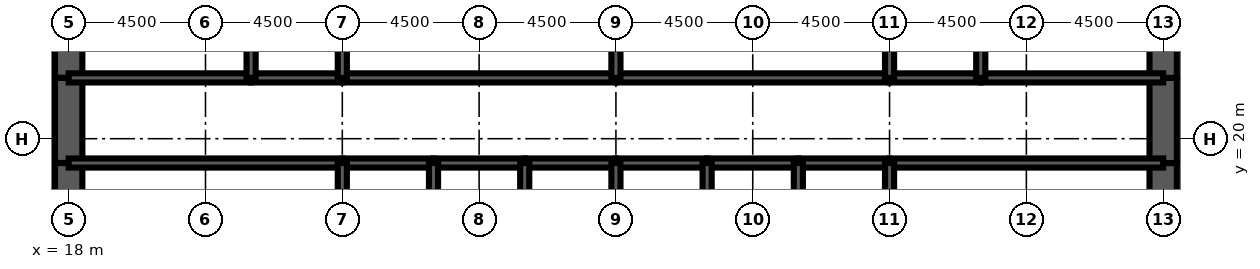
"""IFC4 building model, lengths in metres.
Left out: names, types, materials, properties, quantities, classifications, styles, units other than length and angle.
Written with IfcOpenShell. Run it as: python <this file> out.ifc"""

import sys

from ifc_helpers import new_model, si_unit, direction, frame, frame_2d, origin, place, context, subcontext, project, spatial, rectangle, extrude, element, fill, save


model = new_model("IFC4")
c1 = context("Model", 3, precision=1e-05, world=origin(), true_north=direction((0.0, 1.0)))
c2 = subcontext(c1, "Body", "Model", "MODEL_VIEW")
j1 = project(units=[si_unit("LENGTHUNIT", "METRE"), si_unit("PLANEANGLEUNIT", "RADIAN")], contexts=[c1])
p1 = place(None, origin())
s1 = spatial("IfcSite", under=j1, at=p1, CompositionType="ELEMENT")
p2 = place(p1, origin())
s2 = spatial("IfcBuilding", under=s1, at=p2, CompositionType="ELEMENT")
p3 = place(p2, frame((0.0, 0.0, 41.0)))
s3 = spatial("IfcBuildingStorey", under=s2, at=p3, CompositionType="ELEMENT", Elevation=41.0)
p4 = place(p3, frame((18.0, 26.0, 0.0), z_axis=(0.0, 0.0, 1.0), x_axis=(0.0, -1.0, 0.0)))
e1 = element("IfcWall", 1, at=p4, inside=s3, PredefinedType="SHEAR", context=c2, shape_type="SweptSolid", body=[
    extrude(rectangle(XDim=4.0, YDim=0.9, at=frame_2d((2.0, 0.0))), origin(), (0.0, 0.0, 1.0), 4.5),
])
p5 = place(p3, frame((18.0, 22.0, 0.0), z_axis=(0.0, 0.0, 1.0), x_axis=(0.0, -1.0, 0.0)))
e2 = element("IfcWall", 2, at=p5, inside=s3, PredefinedType="SHEAR", context=c2, shape_type="SweptSolid", body=[
    extrude(rectangle(XDim=2.8, YDim=0.9, at=frame_2d((1.4, 0.0))), origin(), (0.0, 0.0, 1.0), 4.5),
])
p6 = place(p5, frame((0.6, 0.0, 0.0)))
e3 = element("IfcOpeningElement", 3, at=p6, cuts=e2, PredefinedType="OPENING", context=c2, shape_type="SweptSolid", body=[
    extrude(rectangle(XDim=1.8, YDim=2.1, at=frame_2d((0.9, 1.05))), frame((0.0, 0.46, 0.0), z_axis=(0.0, -1.0, 0.0), x_axis=(1.0, 0.0, 0.0)), (0.0, 0.0, 1.0), 0.92),
])
for number, where, z_axis, x_axis in (
    (4, (18.0, 19.2, 0.0), (0.0, 0.0, 1.0), (0.0, -1.0, 0.0)),
    (5, (54.0, 16.0, 0.0), (0.0, 0.0, 1.0), (0.0, 1.0, 0.0)),
):
    element("IfcWall", number, at=place(p3, frame(where, z_axis=z_axis, x_axis=x_axis)), inside=s3, PredefinedType="SHEAR", context=c2, shape_type="SweptSolid", body=[
        extrude(rectangle(XDim=3.2, YDim=0.9, at=frame_2d((1.6, 0.0))), origin(), (0.0, 0.0, 1.0), 4.5),
    ])
p7 = place(p3, frame((54.0, 19.2, 0.0), z_axis=(0.0, 0.0, 1.0), x_axis=(0.0, 1.0, 0.0)))
e6 = element("IfcWall", 6, at=p7, inside=s3, PredefinedType="SHEAR", context=c2, shape_type="SweptSolid", body=[
    extrude(rectangle(XDim=2.8, YDim=0.9, at=frame_2d((1.4, 0.0))), origin(), (0.0, 0.0, 1.0), 4.5),
])
p8 = place(p7, frame((0.4, 0.0, 0.0)))
e7 = element("IfcOpeningElement", 7, at=p8, cuts=e6, PredefinedType="OPENING", context=c2, shape_type="SweptSolid", body=[
    extrude(rectangle(XDim=1.8, YDim=2.1, at=frame_2d((0.9, 1.05))), frame((0.0, 0.46, 0.0), z_axis=(0.0, -1.0, 0.0), x_axis=(1.0, 0.0, 0.0)), (0.0, 0.0, 1.0), 0.92),
])
p9 = place(p3, frame((54.0, 22.0, 0.0), z_axis=(0.0, 0.0, 1.0), x_axis=(0.0, 1.0, 0.0)))
e8 = element("IfcWall", 8, at=p9, inside=s3, PredefinedType="SHEAR", context=c2, shape_type="SweptSolid", body=[
    extrude(rectangle(XDim=4.0, YDim=0.9, at=frame_2d((2.0, 0.0))), origin(), (0.0, 0.0, 1.0), 4.5),
])
p10 = place(p3, frame((18.0, 19.2, 0.0), z_axis=(0.0, 0.0, 1.0), x_axis=(1.0, 0.0, 0.0)))
e9 = element("IfcWall", 9, at=p10, inside=s3, PredefinedType="SOLIDWALL", context=c2, shape_type="SweptSolid", body=[
    extrude(rectangle(XDim=9.0, YDim=0.3, at=frame_2d((4.5, 0.0))), origin(), (0.0, 0.0, 1.0), 4.5),
])
p11 = place(p10, frame((0.65, 0.0, 0.0)))
e10 = element("IfcOpeningElement", 10, at=p11, cuts=e9, PredefinedType="OPENING", context=c2, shape_type="SweptSolid", body=[
    extrude(rectangle(XDim=1.0, YDim=2.1, at=frame_2d((0.5, 1.05))), frame((0.0, 0.16, 0.0), z_axis=(0.0, -1.0, 0.0), x_axis=(1.0, 0.0, 0.0)), (0.0, 0.0, 1.0), 0.32),
])
p12 = place(p3, frame((27.0, 19.2, 0.0), z_axis=(0.0, 0.0, 1.0), x_axis=(1.0, 0.0, 0.0)))
e11 = element("IfcWall", 11, at=p12, inside=s3, PredefinedType="SOLIDWALL", context=c2, shape_type="SweptSolid", body=[
    extrude(rectangle(XDim=3.0, YDim=0.3, at=frame_2d((1.5, 0.0))), origin(), (0.0, 0.0, 1.0), 4.5),
])
p13 = place(p12, frame((0.95, 0.0, 0.0)))
e12 = element("IfcOpeningElement", 12, at=p13, cuts=e11, PredefinedType="OPENING", context=c2, shape_type="SweptSolid", body=[
    extrude(rectangle(XDim=1.1, YDim=2.2, at=frame_2d((0.55, 1.1))), frame((0.0, 0.16, 0.0), z_axis=(0.0, -1.0, 0.0), x_axis=(1.0, 0.0, 0.0)), (0.0, 0.0, 1.0), 0.32),
])
p14 = place(p3, frame((30.0, 19.2, 0.0), z_axis=(0.0, 0.0, 1.0), x_axis=(1.0, 0.0, 0.0)))
e13 = element("IfcWall", 13, at=p14, inside=s3, PredefinedType="SOLIDWALL", context=c2, shape_type="SweptSolid", body=[
    extrude(rectangle(XDim=3.0, YDim=0.3, at=frame_2d((1.5, 0.0))), origin(), (0.0, 0.0, 1.0), 4.5),
])
p15 = place(p14, frame((0.95, 0.0, 0.0)))
e14 = element("IfcOpeningElement", 14, at=p15, cuts=e13, PredefinedType="OPENING", context=c2, shape_type="SweptSolid", body=[
    extrude(rectangle(XDim=1.1, YDim=2.2, at=frame_2d((0.55, 1.1))), frame((0.0, 0.16, 0.0), z_axis=(0.0, -1.0, 0.0), x_axis=(1.0, 0.0, 0.0)), (0.0, 0.0, 1.0), 0.32),
])
p16 = place(p3, frame((33.0, 19.2, 0.0), z_axis=(0.0, 0.0, 1.0), x_axis=(1.0, 0.0, 0.0)))
e15 = element("IfcWall", 15, at=p16, inside=s3, PredefinedType="SOLIDWALL", context=c2, shape_type="SweptSolid", body=[
    extrude(rectangle(XDim=3.0, YDim=0.3, at=frame_2d((1.5, 0.0))), origin(), (0.0, 0.0, 1.0), 4.5),
])
p17 = place(p16, frame((0.95, 0.0, 0.0)))
e16 = element("IfcOpeningElement", 16, at=p17, cuts=e15, PredefinedType="OPENING", context=c2, shape_type="SweptSolid", body=[
    extrude(rectangle(XDim=1.1, YDim=2.2, at=frame_2d((0.55, 1.1))), frame((0.0, 0.16, 0.0), z_axis=(0.0, -1.0, 0.0), x_axis=(1.0, 0.0, 0.0)), (0.0, 0.0, 1.0), 0.32),
])
p18 = place(p3, frame((36.0, 19.2, 0.0), z_axis=(0.0, 0.0, 1.0), x_axis=(1.0, 0.0, 0.0)))
e17 = element("IfcWall", 17, at=p18, inside=s3, PredefinedType="SOLIDWALL", context=c2, shape_type="SweptSolid", body=[
    extrude(rectangle(XDim=3.0, YDim=0.3, at=frame_2d((1.5, 0.0))), origin(), (0.0, 0.0, 1.0), 4.5),
])
p19 = place(p18, frame((0.95, 0.0, 0.0)))
e18 = element("IfcOpeningElement", 18, at=p19, cuts=e17, PredefinedType="OPENING", context=c2, shape_type="SweptSolid", body=[
    extrude(rectangle(XDim=1.1, YDim=2.2, at=frame_2d((0.55, 1.1))), frame((0.0, 0.16, 0.0), z_axis=(0.0, -1.0, 0.0), x_axis=(1.0, 0.0, 0.0)), (0.0, 0.0, 1.0), 0.32),
])
for number, where, z_axis, x_axis in (
    (19, (39.0, 19.2, 0.0), (0.0, 0.0, 1.0), (1.0, 0.0, 0.0)),
    (20, (42.0, 19.2, 0.0), (0.0, 0.0, 1.0), (1.0, 0.0, 0.0)),
):
    element("IfcWall", number, at=place(p3, frame(where, z_axis=z_axis, x_axis=x_axis)), inside=s3, PredefinedType="SOLIDWALL", context=c2, shape_type="SweptSolid", body=[
        extrude(rectangle(XDim=3.0, YDim=0.3, at=frame_2d((1.5, 0.0))), origin(), (0.0, 0.0, 1.0), 4.5),
    ])
p20 = place(p3, frame((45.0, 19.2, 0.0), z_axis=(0.0, 0.0, 1.0), x_axis=(1.0, 0.0, 0.0)))
e21 = element("IfcWall", 21, at=p20, inside=s3, PredefinedType="SOLIDWALL", context=c2, shape_type="SweptSolid", body=[
    extrude(rectangle(XDim=9.0, YDim=0.3, at=frame_2d((4.5, 0.0))), origin(), (0.0, 0.0, 1.0), 4.5),
])
p21 = place(p20, frame((7.35, 0.0, 0.0)))
e22 = element("IfcOpeningElement", 22, at=p21, cuts=e21, PredefinedType="OPENING", context=c2, shape_type="SweptSolid", body=[
    extrude(rectangle(XDim=1.0, YDim=2.1, at=frame_2d((0.5, 1.05))), frame((0.0, 0.16, 0.0), z_axis=(0.0, -1.0, 0.0), x_axis=(1.0, 0.0, 0.0)), (0.0, 0.0, 1.0), 0.32),
])
p22 = place(p3, frame((18.0, 22.0, 0.0), z_axis=(0.0, 0.0, 1.0), x_axis=(1.0, 0.0, 0.0)))
e23 = element("IfcWall", 23, at=p22, inside=s3, PredefinedType="SOLIDWALL", context=c2, shape_type="SweptSolid", body=[
    extrude(rectangle(XDim=6.0, YDim=0.3, at=frame_2d((3.0, 0.0))), origin(), (0.0, 0.0, 1.0), 4.5),
])
p23 = place(p22, frame((4.4, 0.0, 0.0)))
e24 = element("IfcOpeningElement", 24, at=p23, cuts=e23, PredefinedType="OPENING", context=c2, shape_type="SweptSolid", body=[
    extrude(rectangle(XDim=1.0, YDim=2.1, at=frame_2d((0.5, 1.05))), frame((0.0, 0.16, 0.0), z_axis=(0.0, -1.0, 0.0), x_axis=(1.0, 0.0, 0.0)), (0.0, 0.0, 1.0), 0.32),
])
p24 = place(p22, frame((0.85, 0.0, 0.0)))
e25 = element("IfcOpeningElement", 25, at=p24, cuts=e23, PredefinedType="OPENING", context=c2, shape_type="SweptSolid", body=[
    extrude(rectangle(XDim=1.0, YDim=2.1, at=frame_2d((0.5, 1.05))), frame((0.0, 0.16, 0.0), z_axis=(0.0, -1.0, 0.0), x_axis=(1.0, 0.0, 0.0)), (0.0, 0.0, 1.0), 0.32),
])
p25 = place(p3, frame((24.0, 22.0, 0.0), z_axis=(0.0, 0.0, 1.0), x_axis=(1.0, 0.0, 0.0)))
e26 = element("IfcWall", 26, at=p25, inside=s3, PredefinedType="SOLIDWALL", context=c2, shape_type="SweptSolid", body=[
    extrude(rectangle(XDim=3.0, YDim=0.3, at=frame_2d((1.5, 0.0))), origin(), (0.0, 0.0, 1.0), 4.5),
])
p26 = place(p25, frame((1.0, 0.0, 0.0)))
e27 = element("IfcOpeningElement", 27, at=p26, cuts=e26, PredefinedType="OPENING", context=c2, shape_type="SweptSolid", body=[
    extrude(rectangle(XDim=1.0, YDim=2.1, at=frame_2d((0.5, 1.05))), frame((0.0, 0.16, 0.0), z_axis=(0.0, -1.0, 0.0), x_axis=(1.0, 0.0, 0.0)), (0.0, 0.0, 1.0), 0.32),
])
p27 = place(p3, frame((27.0, 22.0, 0.0), z_axis=(0.0, 0.0, 1.0), x_axis=(1.0, 0.0, 0.0)))
e28 = element("IfcWall", 28, at=p27, inside=s3, PredefinedType="SOLIDWALL", context=c2, shape_type="SweptSolid", body=[
    extrude(rectangle(XDim=9.0, YDim=0.3, at=frame_2d((4.5, 0.0))), origin(), (0.0, 0.0, 1.0), 4.5),
])
p28 = place(p27, frame((4.0, 0.0, 0.0)))
e29 = element("IfcOpeningElement", 29, at=p28, cuts=e28, PredefinedType="OPENING", context=c2, shape_type="SweptSolid", body=[
    extrude(rectangle(XDim=1.0, YDim=2.1, at=frame_2d((0.5, 1.05))), frame((0.0, 0.16, 0.0), z_axis=(0.0, -1.0, 0.0), x_axis=(1.0, 0.0, 0.0)), (0.0, 0.0, 1.0), 0.32),
])
p29 = place(p3, frame((36.0, 22.0, 0.0), z_axis=(0.0, 0.0, 1.0), x_axis=(1.0, 0.0, 0.0)))
e30 = element("IfcWall", 30, at=p29, inside=s3, PredefinedType="SOLIDWALL", context=c2, shape_type="SweptSolid", body=[
    extrude(rectangle(XDim=9.0, YDim=0.3, at=frame_2d((4.5, 0.0))), origin(), (0.0, 0.0, 1.0), 4.5),
])
p30 = place(p29, frame((4.0, 0.0, 0.0)))
e31 = element("IfcOpeningElement", 31, at=p30, cuts=e30, PredefinedType="OPENING", context=c2, shape_type="SweptSolid", body=[
    extrude(rectangle(XDim=1.0, YDim=2.1, at=frame_2d((0.5, 1.05))), frame((0.0, 0.16, 0.0), z_axis=(0.0, -1.0, 0.0), x_axis=(1.0, 0.0, 0.0)), (0.0, 0.0, 1.0), 0.32),
])
p31 = place(p3, frame((45.0, 22.0, 0.0), z_axis=(0.0, 0.0, 1.0), x_axis=(1.0, 0.0, 0.0)))
e32 = element("IfcWall", 32, at=p31, inside=s3, PredefinedType="SOLIDWALL", context=c2, shape_type="SweptSolid", body=[
    extrude(rectangle(XDim=3.0, YDim=0.3, at=frame_2d((1.5, 0.0))), origin(), (0.0, 0.0, 1.0), 4.5),
])
p32 = place(p31, frame((1.0, 0.0, 0.0)))
e33 = element("IfcOpeningElement", 33, at=p32, cuts=e32, PredefinedType="OPENING", context=c2, shape_type="SweptSolid", body=[
    extrude(rectangle(XDim=1.0, YDim=2.1, at=frame_2d((0.5, 1.05))), frame((0.0, 0.16, 0.0), z_axis=(0.0, -1.0, 0.0), x_axis=(1.0, 0.0, 0.0)), (0.0, 0.0, 1.0), 0.32),
])
p33 = place(p3, frame((48.0, 22.0, 0.0), z_axis=(0.0, 0.0, 1.0), x_axis=(1.0, 0.0, 0.0)))
e34 = element("IfcWall", 34, at=p33, inside=s3, PredefinedType="SOLIDWALL", context=c2, shape_type="SweptSolid", body=[
    extrude(rectangle(XDim=6.0, YDim=0.3, at=frame_2d((3.0, 0.0))), origin(), (0.0, 0.0, 1.0), 4.5),
])
p34 = place(p33, frame((2.0, 0.0, 0.0)))
e35 = element("IfcOpeningElement", 35, at=p34, cuts=e34, PredefinedType="OPENING", context=c2, shape_type="SweptSolid", body=[
    extrude(rectangle(XDim=1.0, YDim=2.1, at=frame_2d((0.5, 1.05))), frame((0.0, 0.16, 0.0), z_axis=(0.0, -1.0, 0.0), x_axis=(1.0, 0.0, 0.0)), (0.0, 0.0, 1.0), 0.32),
])
p35 = place(p33, frame((4.0, 0.0, 0.0)))
e36 = element("IfcOpeningElement", 36, at=p35, cuts=e34, PredefinedType="OPENING", context=c2, shape_type="SweptSolid", body=[
    extrude(rectangle(XDim=1.0, YDim=2.1, at=frame_2d((0.5, 1.05))), frame((0.0, 0.16, 0.0), z_axis=(0.0, -1.0, 0.0), x_axis=(1.0, 0.0, 0.0)), (0.0, 0.0, 1.0), 0.32),
])
for number, where, z_axis, x_axis in (
    (37, (27.0, 16.0, 0.0), (0.0, 0.0, 1.0), (0.0, 1.0, 0.0)),
    (38, (30.0, 16.0, 0.0), (0.0, 0.0, 1.0), (0.0, 1.0, 0.0)),
    (39, (33.0, 16.0, 0.0), (0.0, 0.0, 1.0), (0.0, 1.0, 0.0)),
    (40, (36.0, 16.0, 0.0), (0.0, 0.0, 1.0), (0.0, 1.0, 0.0)),
    (41, (39.0, 16.0, 0.0), (0.0, 0.0, 1.0), (0.0, 1.0, 0.0)),
    (42, (42.0, 16.0, 0.0), (0.0, 0.0, 1.0), (0.0, 1.0, 0.0)),
    (43, (45.0, 16.0, 0.0), (0.0, 0.0, 1.0), (0.0, 1.0, 0.0)),
):
    element("IfcWall", number, at=place(p3, frame(where, z_axis=z_axis, x_axis=x_axis)), inside=s3, PredefinedType="SOLIDWALL", context=c2, shape_type="SweptSolid", body=[
        extrude(rectangle(XDim=3.2, YDim=0.3, at=frame_2d((1.6, 0.0))), origin(), (0.0, 0.0, 1.0), 4.5),
    ])
for number, where, z_axis, x_axis in (
    (44, (24.0, 22.0, 0.0), (0.0, 0.0, 1.0), (0.0, 1.0, 0.0)),
    (45, (27.0, 22.0, 0.0), (0.0, 0.0, 1.0), (0.0, 1.0, 0.0)),
    (46, (36.0, 22.0, 0.0), (0.0, 0.0, 1.0), (0.0, 1.0, 0.0)),
    (47, (45.0, 22.0, 0.0), (0.0, 0.0, 1.0), (0.0, 1.0, 0.0)),
    (48, (48.0, 22.0, 0.0), (0.0, 0.0, 1.0), (0.0, 1.0, 0.0)),
):
    element("IfcWall", number, at=place(p3, frame(where, z_axis=z_axis, x_axis=x_axis)), inside=s3, PredefinedType="SOLIDWALL", context=c2, shape_type="SweptSolid", body=[
        extrude(rectangle(XDim=4.0, YDim=0.3, at=frame_2d((2.0, 0.0))), origin(), (0.0, 0.0, 1.0), 4.5),
    ])
p36 = place(p3, frame((42.0, 22.15, 0.0), z_axis=(0.0, 0.0, 1.0), x_axis=(0.0, 1.0, 0.0)))
e49 = element("IfcWall", 49, at=p36, inside=s3, PredefinedType="PARTITIONING", context=c2, shape_type="SweptSolid", body=[
    extrude(rectangle(XDim=3.7, YDim=0.15, at=frame_2d((1.85, 0.0))), origin(), (0.0, 0.0, 1.0), 3.0),
])
p37 = place(p36, frame((2.2, 0.0, 0.0)))
e50 = element("IfcOpeningElement", 50, at=p37, cuts=e49, PredefinedType="OPENING", context=c2, shape_type="SweptSolid", body=[
    extrude(rectangle(XDim=1.0, YDim=2.1, at=frame_2d((0.5, 1.05))), frame((0.0, 0.085, 0.0), z_axis=(0.0, -1.0, 0.0), x_axis=(1.0, 0.0, 0.0)), (0.0, 0.0, 1.0), 0.17),
])
for number, where, z_axis, x_axis in (
    (51, (20.325, 22.15, 0.0), (0.0, 0.0, 1.0), (0.0, 1.0, 0.0)),
    (52, (51.375, 22.15, 0.0), (0.0, 0.0, 1.0), (0.0, 1.0, 0.0)),
):
    element("IfcWall", number, at=place(p3, frame(where, z_axis=z_axis, x_axis=x_axis)), inside=s3, PredefinedType="PARTITIONING", context=c2, shape_type="SweptSolid", body=[
        extrude(rectangle(XDim=3.7, YDim=0.15, at=frame_2d((1.85, 0.0))), origin(), (0.0, 0.0, 1.0), 3.0),
    ])
p38 = place(p13, origin())
e53 = element("IfcDoor", 53, at=p38, inside=s3, OperationType="DOUBLE_DOOR_SLIDING", PredefinedType="USERDEFINED", context=c2, shape_type="SweptSolid", body=[
    extrude(rectangle(XDim=1.1, YDim=2.2, at=frame_2d((0.55, 1.1))), frame((0.0, 0.025, 0.0), z_axis=(0.0, -1.0, 0.0), x_axis=(1.0, 0.0, 0.0)), (0.0, 0.0, 1.0), 0.05),
])
fill(e12, e53)
p39 = place(p15, origin())
e54 = element("IfcDoor", 54, at=p39, inside=s3, OperationType="DOUBLE_DOOR_SLIDING", PredefinedType="USERDEFINED", context=c2, shape_type="SweptSolid", body=[
    extrude(rectangle(XDim=1.1, YDim=2.2, at=frame_2d((0.55, 1.1))), frame((0.0, 0.025, 0.0), z_axis=(0.0, -1.0, 0.0), x_axis=(1.0, 0.0, 0.0)), (0.0, 0.0, 1.0), 0.05),
])
fill(e14, e54)
p40 = place(p17, origin())
e55 = element("IfcDoor", 55, at=p40, inside=s3, OperationType="DOUBLE_DOOR_SLIDING", PredefinedType="USERDEFINED", context=c2, shape_type="SweptSolid", body=[
    extrude(rectangle(XDim=1.1, YDim=2.2, at=frame_2d((0.55, 1.1))), frame((0.0, 0.025, 0.0), z_axis=(0.0, -1.0, 0.0), x_axis=(1.0, 0.0, 0.0)), (0.0, 0.0, 1.0), 0.05),
])
fill(e16, e55)
p41 = place(p19, origin())
e56 = element("IfcDoor", 56, at=p41, inside=s3, OperationType="DOUBLE_DOOR_SLIDING", PredefinedType="USERDEFINED", context=c2, shape_type="SweptSolid", body=[
    extrude(rectangle(XDim=1.1, YDim=2.2, at=frame_2d((0.55, 1.1))), frame((0.0, 0.025, 0.0), z_axis=(0.0, -1.0, 0.0), x_axis=(1.0, 0.0, 0.0)), (0.0, 0.0, 1.0), 0.05),
])
fill(e18, e56)
p42 = place(p11, origin())
e57 = element("IfcDoor", 57, at=p42, inside=s3, OperationType="SINGLE_SWING_LEFT", PredefinedType="DOOR", context=c2, shape_type="SweptSolid", body=[
    extrude(rectangle(XDim=1.0, YDim=2.1, at=frame_2d((0.5, 1.05))), frame((0.0, 0.025, 0.0), z_axis=(0.0, -1.0, 0.0), x_axis=(1.0, 0.0, 0.0)), (0.0, 0.0, 1.0), 0.05),
])
fill(e10, e57)
p43 = place(p21, origin())
e58 = element("IfcDoor", 58, at=p43, inside=s3, OperationType="SINGLE_SWING_RIGHT", PredefinedType="DOOR", context=c2, shape_type="SweptSolid", body=[
    extrude(rectangle(XDim=1.0, YDim=2.1, at=frame_2d((0.5, 1.05))), frame((0.0, 0.025, 0.0), z_axis=(0.0, -1.0, 0.0), x_axis=(1.0, 0.0, 0.0)), (0.0, 0.0, 1.0), 0.05),
])
fill(e22, e58)
p44 = place(p6, origin())
e59 = element("IfcDoor", 59, at=p44, inside=s3, OperationType="SINGLE_SWING_LEFT", PredefinedType="DOOR", context=c2, shape_type="SweptSolid", body=[
    extrude(rectangle(XDim=1.8, YDim=2.1, at=frame_2d((0.9, 1.05))), frame((0.0, 0.45, 0.0), z_axis=(0.0, -1.0, 0.0), x_axis=(1.0, 0.0, 0.0)), (0.0, 0.0, 1.0), 0.899),
])
fill(e3, e59)
p45 = place(p8, origin())
e60 = element("IfcDoor", 60, at=p45, inside=s3, OperationType="SINGLE_SWING_LEFT", PredefinedType="DOOR", context=c2, shape_type="SweptSolid", body=[
    extrude(rectangle(XDim=1.8, YDim=2.1, at=frame_2d((0.9, 1.05))), frame((0.0, 0.45, 0.0), z_axis=(0.0, -1.0, 0.0), x_axis=(1.0, 0.0, 0.0)), (0.0, 0.0, 1.0), 0.899),
])
fill(e7, e60)
p46 = place(p23, origin())
e61 = element("IfcDoor", 61, at=p46, inside=s3, OperationType="SINGLE_SWING_RIGHT", PredefinedType="DOOR", context=c2, shape_type="SweptSolid", body=[
    extrude(rectangle(XDim=1.0, YDim=2.1, at=frame_2d((0.5, 1.05))), frame((0.0, 0.025, 0.0), z_axis=(0.0, -1.0, 0.0), x_axis=(1.0, 0.0, 0.0)), (0.0, 0.0, 1.0), 0.05),
])
fill(e24, e61)
p47 = place(p26, origin())
e62 = element("IfcDoor", 62, at=p47, inside=s3, OperationType="SINGLE_SWING_LEFT", PredefinedType="DOOR", context=c2, shape_type="SweptSolid", body=[
    extrude(rectangle(XDim=1.0, YDim=2.1, at=frame_2d((0.5, 1.05))), frame((0.0, 0.025, 0.0), z_axis=(0.0, -1.0, 0.0), x_axis=(1.0, 0.0, 0.0)), (0.0, 0.0, 1.0), 0.05),
])
fill(e27, e62)
p48 = place(p28, origin())
e63 = element("IfcDoor", 63, at=p48, inside=s3, OperationType="SINGLE_SWING_LEFT", PredefinedType="DOOR", context=c2, shape_type="SweptSolid", body=[
    extrude(rectangle(XDim=1.0, YDim=2.1, at=frame_2d((0.5, 1.05))), frame((0.0, 0.025, 0.0), z_axis=(0.0, -1.0, 0.0), x_axis=(1.0, 0.0, 0.0)), (0.0, 0.0, 1.0), 0.05),
])
fill(e29, e63)
p49 = place(p30, origin())
e64 = element("IfcDoor", 64, at=p49, inside=s3, OperationType="SINGLE_SWING_LEFT", PredefinedType="DOOR", context=c2, shape_type="SweptSolid", body=[
    extrude(rectangle(XDim=1.0, YDim=2.1, at=frame_2d((0.5, 1.05))), frame((0.0, 0.025, 0.0), z_axis=(0.0, -1.0, 0.0), x_axis=(1.0, 0.0, 0.0)), (0.0, 0.0, 1.0), 0.05),
])
fill(e31, e64)
p50 = place(p32, origin())
e65 = element("IfcDoor", 65, at=p50, inside=s3, OperationType="SINGLE_SWING_LEFT", PredefinedType="DOOR", context=c2, shape_type="SweptSolid", body=[
    extrude(rectangle(XDim=1.0, YDim=2.1, at=frame_2d((0.5, 1.05))), frame((0.0, 0.025, 0.0), z_axis=(0.0, -1.0, 0.0), x_axis=(1.0, 0.0, 0.0)), (0.0, 0.0, 1.0), 0.05),
])
fill(e33, e65)
p51 = place(p34, origin())
e66 = element("IfcDoor", 66, at=p51, inside=s3, OperationType="SINGLE_SWING_LEFT", PredefinedType="DOOR", context=c2, shape_type="SweptSolid", body=[
    extrude(rectangle(XDim=1.0, YDim=2.1, at=frame_2d((0.5, 1.05))), frame((0.0, 0.025, 0.0), z_axis=(0.0, -1.0, 0.0), x_axis=(1.0, 0.0, 0.0)), (0.0, 0.0, 1.0), 0.05),
])
fill(e35, e66)
p52 = place(p24, origin())
e67 = element("IfcDoor", 67, at=p52, inside=s3, OperationType="SINGLE_SWING_LEFT", PredefinedType="DOOR", context=c2, shape_type="SweptSolid", body=[
    extrude(rectangle(XDim=1.0, YDim=2.1, at=frame_2d((0.5, 1.05))), frame((0.0, 0.025, 0.0), z_axis=(0.0, -1.0, 0.0), x_axis=(1.0, 0.0, 0.0)), (0.0, 0.0, 1.0), 0.05),
])
fill(e25, e67)
p53 = place(p35, origin())
e68 = element("IfcDoor", 68, at=p53, inside=s3, OperationType="SINGLE_SWING_RIGHT", PredefinedType="DOOR", context=c2, shape_type="SweptSolid", body=[
    extrude(rectangle(XDim=1.0, YDim=2.1, at=frame_2d((0.5, 1.05))), frame((0.0, 0.025, 0.0), z_axis=(0.0, -1.0, 0.0), x_axis=(1.0, 0.0, 0.0)), (0.0, 0.0, 1.0), 0.05),
])
fill(e36, e68)
save(model, sys.argv[1])
